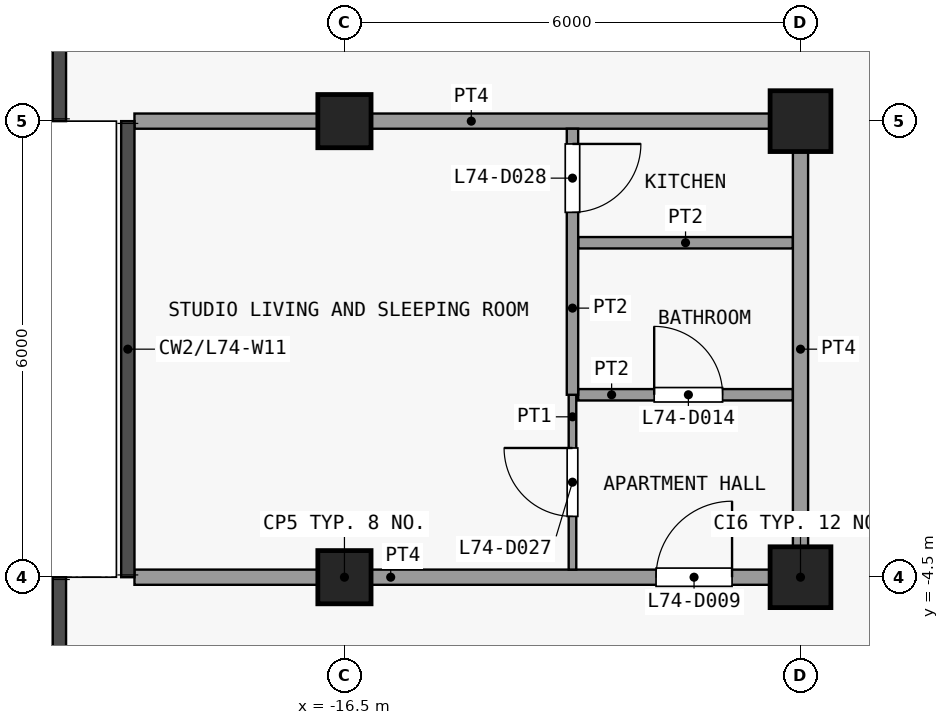
"""IFC4 building model, lengths in metres.
Left out: names, types, materials, properties, quantities, classifications, styles, units other than length and angle.
Written with IfcOpenShell. Run it as: python <this file> out.ifc"""

import sys

from ifc_helpers import new_model, si_unit, direction, frame, frame_2d, origin, origin_2d, place, context, subcontext, project, spatial, rectangle, extrude, element, fill, save


model = new_model("IFC4")
c1 = context("Model", 3, precision=1e-05, world=origin(), true_north=direction((0.0, 1.0)))
c2 = subcontext(c1, "Body", "Model", "MODEL_VIEW")
j1 = project(units=[si_unit("LENGTHUNIT", "METRE"), si_unit("PLANEANGLEUNIT", "RADIAN")], contexts=[c1])
p1 = place(None, origin())
s1 = spatial("IfcSite", under=j1, at=p1, CompositionType="ELEMENT")
p2 = place(p1, origin())
s2 = spatial("IfcBuilding", under=s1, at=p2, CompositionType="ELEMENT")
p3 = place(p2, frame((0.0, 0.0, 291.5)))
s3 = spatial("IfcBuildingStorey", under=s2, at=p3, CompositionType="ELEMENT", Elevation=291.5)
for number, where, z_axis, x_axis in (
    (1, (-16.5, -4.5, 0.0), (0.0, 0.0, 1.0), (1.0, 0.0, 0.0)),
    (2, (-16.5, 1.5, 0.0), (0.0, 0.0, 1.0), (1.0, 0.0, 0.0)),
):
    element("IfcColumn", number, at=place(p3, frame(where, z_axis=z_axis, x_axis=x_axis)), inside=s3, PredefinedType="COLUMN", context=c2, shape_type="SweptSolid", body=[
        extrude(rectangle(XDim=0.7, YDim=0.7, at=origin_2d()), origin(), (0.0, 0.0, 1.0), 3.6),
    ])
for number, where, z_axis, x_axis in (
    (3, (-10.5, -4.5, 0.0), (0.0, 0.0, 1.0), (1.0, 0.0, 0.0)),
    (4, (-10.5, 1.5, 0.0), (0.0, 0.0, 1.0), (1.0, 0.0, 0.0)),
):
    element("IfcColumn", number, at=place(p3, frame(where, z_axis=z_axis, x_axis=x_axis)), inside=s3, PredefinedType="COLUMN", context=c2, shape_type="SweptSolid", body=[
        extrude(rectangle(XDim=0.8, YDim=0.8, at=origin_2d()), origin(), (0.0, 0.0, 1.0), 3.6),
    ])
p4 = place(p3, frame((-19.262, -4.5, 0.0), z_axis=(0.0, 0.0, 1.0), x_axis=(1.0, 0.0, 0.0)))
e5 = element("IfcWall", 5, at=p4, inside=s3, PredefinedType="PARTITIONING", context=c2, shape_type="SweptSolid", body=[
    extrude(rectangle(XDim=8.863, YDim=0.2, at=frame_2d((4.431, 0.0))), origin(), (0.0, 0.0, 1.0), 3.3),
])
p5 = place(p4, frame((6.862, 0.0, 0.0)))
e6 = element("IfcOpeningElement", 6, at=p5, cuts=e5, PredefinedType="OPENING", context=c2, shape_type="SweptSolid", body=[
    extrude(rectangle(XDim=1.0, YDim=2.1, at=frame_2d((0.5, 1.05))), frame((0.0, 0.11, 0.0), z_axis=(0.0, -1.0, 0.0), x_axis=(1.0, 0.0, 0.0)), (0.0, 0.0, 1.0), 0.22),
])
p6 = place(p3, frame((-13.425, -2.1, 0.0), z_axis=(0.0, 0.0, 1.0), x_axis=(1.0, 0.0, 0.0)))
e7 = element("IfcWall", 7, at=p6, inside=s3, PredefinedType="PARTITIONING", context=c2, shape_type="SweptSolid", body=[
    extrude(rectangle(XDim=2.825, YDim=0.15, at=frame_2d((1.413, 0.0))), origin(), (0.0, 0.0, 1.0), 3.3),
])
p7 = place(p6, frame((1.0, 0.0, 0.0)))
e8 = element("IfcOpeningElement", 8, at=p7, cuts=e7, PredefinedType="OPENING", context=c2, shape_type="SweptSolid", body=[
    extrude(rectangle(XDim=0.9, YDim=2.1, at=frame_2d((0.45, 1.05))), frame((0.0, 0.085, 0.0), z_axis=(0.0, -1.0, 0.0), x_axis=(1.0, 0.0, 0.0)), (0.0, 0.0, 1.0), 0.17),
])
p8 = place(p3, frame((-13.425, -0.1, 0.0), z_axis=(0.0, 0.0, 1.0), x_axis=(1.0, 0.0, 0.0)))
e9 = element("IfcWall", 9, at=p8, inside=s3, PredefinedType="PARTITIONING", context=c2, shape_type="SweptSolid", body=[
    extrude(rectangle(XDim=2.825, YDim=0.15, at=frame_2d((1.413, 0.0))), origin(), (0.0, 0.0, 1.0), 3.3),
])
p9 = place(p3, frame((-19.262, 1.5, 0.0), z_axis=(0.0, 0.0, 1.0), x_axis=(1.0, 0.0, 0.0)))
e10 = element("IfcWall", 10, at=p9, inside=s3, PredefinedType="PARTITIONING", context=c2, shape_type="SweptSolid", body=[
    extrude(rectangle(XDim=8.863, YDim=0.2, at=frame_2d((4.431, 0.0))), origin(), (0.0, 0.0, 1.0), 3.3),
])
p10 = place(p3, frame((-13.5, -4.4, 0.0), z_axis=(0.0, 0.0, 1.0), x_axis=(0.0, 1.0, 0.0)))
e11 = element("IfcWall", 11, at=p10, inside=s3, PredefinedType="PARTITIONING", context=c2, shape_type="SweptSolid", body=[
    extrude(rectangle(XDim=2.3, YDim=0.1, at=frame_2d((1.15, 0.0))), origin(), (0.0, 0.0, 1.0), 3.3),
])
p11 = place(p10, frame((0.7, 0.0, 0.0)))
e12 = element("IfcOpeningElement", 12, at=p11, cuts=e11, PredefinedType="OPENING", context=c2, shape_type="SweptSolid", body=[
    extrude(rectangle(XDim=0.9, YDim=2.1, at=frame_2d((0.45, 1.05))), frame((0.0, 0.06, 0.0), z_axis=(0.0, -1.0, 0.0), x_axis=(1.0, 0.0, 0.0)), (0.0, 0.0, 1.0), 0.12),
])
p12 = place(p3, frame((-13.5, -2.1, 0.0), z_axis=(0.0, 0.0, 1.0), x_axis=(0.0, 1.0, 0.0)))
e13 = element("IfcWall", 13, at=p12, inside=s3, PredefinedType="PARTITIONING", context=c2, shape_type="SweptSolid", body=[
    extrude(rectangle(XDim=3.5, YDim=0.15, at=frame_2d((1.75, 0.0))), origin(), (0.0, 0.0, 1.0), 3.3),
])
p13 = place(p12, frame((2.4, 0.0, 0.0)))
e14 = element("IfcOpeningElement", 14, at=p13, cuts=e13, PredefinedType="OPENING", context=c2, shape_type="SweptSolid", body=[
    extrude(rectangle(XDim=0.9, YDim=2.1, at=frame_2d((0.45, 1.05))), frame((0.0, 0.085, 0.0), z_axis=(0.0, -1.0, 0.0), x_axis=(1.0, 0.0, 0.0)), (0.0, 0.0, 1.0), 0.17),
])
p14 = place(p3, frame((-10.5, -4.4, 0.0), z_axis=(0.0, 0.0, 1.0), x_axis=(0.0, 1.0, 0.0)))
e15 = element("IfcWall", 15, at=p14, inside=s3, PredefinedType="PARTITIONING", context=c2, shape_type="SweptSolid", body=[
    extrude(rectangle(XDim=5.8, YDim=0.2, at=frame_2d((2.9, 0.0))), origin(), (0.0, 0.0, 1.0), 3.3),
])
p15 = place(p5, origin())
e16 = element("IfcDoor", 16, at=p15, inside=s3, OperationType="SINGLE_SWING_LEFT", PredefinedType="DOOR", context=c2, shape_type="SweptSolid", body=[
    extrude(rectangle(XDim=1.0, YDim=2.1, at=frame_2d((0.5, 1.05))), frame((0.0, 0.025, 0.0), z_axis=(0.0, -1.0, 0.0), x_axis=(1.0, 0.0, 0.0)), (0.0, 0.0, 1.0), 0.05),
])
fill(e6, e16)
p16 = place(p7, origin())
e17 = element("IfcDoor", 17, at=p16, inside=s3, OperationType="SINGLE_SWING_RIGHT", PredefinedType="DOOR", context=c2, shape_type="SweptSolid", body=[
    extrude(rectangle(XDim=0.9, YDim=2.1, at=frame_2d((0.45, 1.05))), frame((0.0, 0.025, 0.0), z_axis=(0.0, -1.0, 0.0), x_axis=(1.0, 0.0, 0.0)), (0.0, 0.0, 1.0), 0.05),
])
fill(e8, e17)
p17 = place(p11, origin())
e18 = element("IfcDoor", 18, at=p17, inside=s3, OperationType="SINGLE_SWING_LEFT", PredefinedType="DOOR", context=c2, shape_type="SweptSolid", body=[
    extrude(rectangle(XDim=0.9, YDim=2.1, at=frame_2d((0.45, 1.05))), frame((0.0, 0.025, 0.0), z_axis=(0.0, -1.0, 0.0), x_axis=(1.0, 0.0, 0.0)), (0.0, 0.0, 1.0), 0.05),
])
fill(e12, e18)
p18 = place(p13, origin())
e19 = element("IfcDoor", 19, at=p18, inside=s3, OperationType="SINGLE_SWING_RIGHT", PredefinedType="DOOR", context=c2, shape_type="SweptSolid", body=[
    extrude(rectangle(XDim=0.9, YDim=2.1, at=frame_2d((0.45, 1.05))), frame((0.0, 0.025, 0.0), z_axis=(0.0, -1.0, 0.0), x_axis=(1.0, 0.0, 0.0)), (0.0, 0.0, 1.0), 0.05),
])
fill(e14, e19)
save(model, sys.argv[1])
